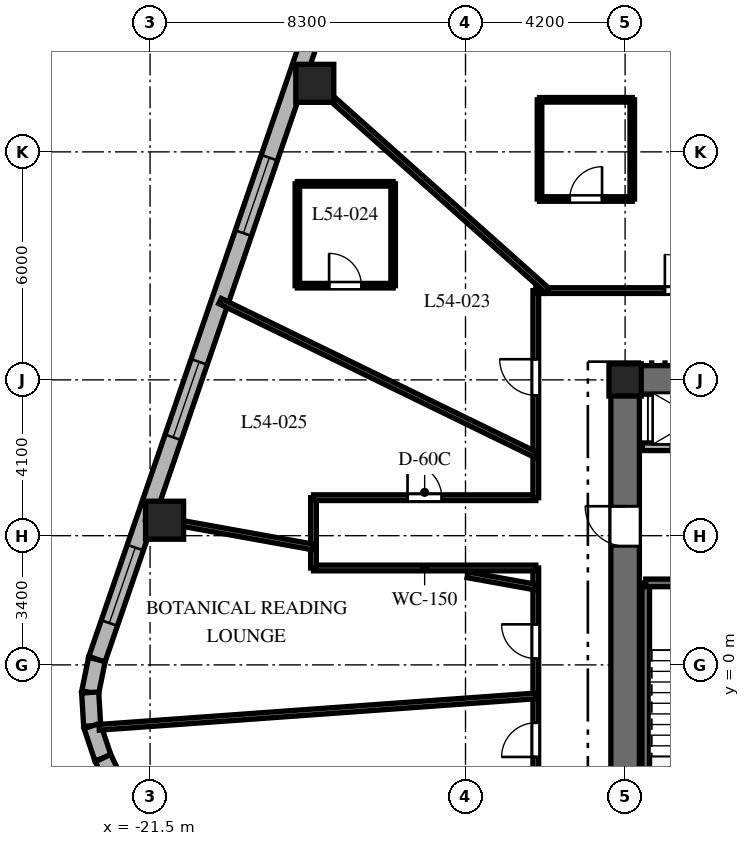
"""IFC4 building model, lengths in metres.
Left out: names, types, materials, properties, quantities, classifications, styles, units other than length and angle.
Written with IfcOpenShell. Run it as: python <this file> out.ifc"""

import sys

from ifc_helpers import new_model, si_unit, direction, frame, frame_2d, origin, origin_2d, place, context, subcontext, project, spatial, rectangle, extrude, element, fill, save


model = new_model("IFC4")
c1 = context("Model", 3, precision=1e-05, world=origin(), true_north=direction((0.0, 1.0)))
c2 = subcontext(c1, "Body", "Model", "MODEL_VIEW")
j1 = project(units=[si_unit("LENGTHUNIT", "METRE"), si_unit("PLANEANGLEUNIT", "RADIAN")], contexts=[c1])
p1 = place(None, origin())
s1 = spatial("IfcSite", under=j1, at=p1, CompositionType="ELEMENT")
p2 = place(p1, origin())
s2 = spatial("IfcBuilding", under=s1, at=p2, CompositionType="ELEMENT")
p3 = place(p2, frame((0.0, 0.0, 217.9)))
s3 = spatial("IfcBuildingStorey", under=s2, at=p3, CompositionType="ELEMENT", Elevation=217.9)
p4 = place(p3, frame((-9.375, 7.5, 0.0), z_axis=(0.0, 0.0, 1.0), x_axis=(1.0, 0.0, 0.0)))
e1 = element("IfcWall", 1, at=p4, inside=s3, PredefinedType="SHEAR", context=c2, shape_type="SweptSolid", body=[
    extrude(rectangle(XDim=9.425, YDim=0.75, at=frame_2d((4.712, 0.0))), origin(), (0.0, 0.0, 1.0), 3.8),
])
p5 = place(p3, frame((-9.0, -7.125, 0.0), z_axis=(0.0, 0.0, 1.0), x_axis=(0.0, 1.0, 0.0)))
e2 = element("IfcWall", 2, at=p5, inside=s3, PredefinedType="SHEAR", context=c2, shape_type="SweptSolid", body=[
    extrude(rectangle(XDim=14.25, YDim=0.75, at=frame_2d((7.125, 0.0))), origin(), (0.0, 0.0, 1.0), 3.8),
])
p6 = place(p5, frame((10.25, 0.0, 0.0)))
e3 = element("IfcOpeningElement", 3, at=p6, cuts=e2, PredefinedType="OPENING", context=c2, shape_type="SweptSolid", body=[
    extrude(rectangle(XDim=1.05, YDim=2.15, at=frame_2d((0.525, 1.075))), frame((0.0, 0.385, 0.0), z_axis=(0.0, -1.0, 0.0), x_axis=(1.0, 0.0, 0.0)), (0.0, 0.0, 1.0), 0.77),
])
p7 = place(p3, frame((-8.458, -6.985, 0.0), z_axis=(0.0, 0.0, 1.0), x_axis=(0.0, 1.0, 0.0)))
e4 = element("IfcWall", 4, at=p7, inside=s3, PredefinedType="SHEAR", context=c2, shape_type="SweptSolid", body=[
    extrude(rectangle(XDim=9.143, YDim=0.2, at=frame_2d((4.572, 0.0))), origin(), (0.0, 0.0, 1.0), 3.8),
])
p8 = place(p3, frame((-8.458, 2.158, 0.0), z_axis=(0.0, 0.0, 1.0), x_axis=(1.0, 0.0, 0.0)))
e5 = element("IfcWall", 5, at=p8, inside=s3, PredefinedType="SHEAR", context=c2, shape_type="SweptSolid", body=[
    extrude(rectangle(XDim=3.686, YDim=0.2, at=frame_2d((1.843, 0.0))), origin(), (0.0, 0.0, 1.0), 3.8),
])
p9 = place(p8, frame((1.3, 0.0, 0.0)))
e6 = element("IfcOpeningElement", 6, at=p9, cuts=e5, PredefinedType="OPENING", context=c2, shape_type="SweptSolid", body=[
    extrude(rectangle(XDim=1.0, YDim=2.15, at=frame_2d((0.5, 1.075))), frame((0.0, 0.11, 0.0), z_axis=(0.0, -1.0, 0.0), x_axis=(1.0, 0.0, 0.0)), (0.0, 0.0, 1.0), 0.22),
])
p10 = place(p3, frame((-9.0, 7.5, 0.0), z_axis=(0.0, 0.0, 1.0), x_axis=(1.0, 0.0, 0.0)))
e7 = element("IfcColumn", 7, at=p10, inside=s3, PredefinedType="COLUMN", context=c2, shape_type="SweptSolid", body=[
    extrude(rectangle(XDim=0.85, YDim=0.85, at=origin_2d()), origin(), (0.0, 0.0, 1.0), 3.8),
])
for number, where, z_axis, x_axis in (
    (8, (-17.166, 15.304, 0.0), (0.0, 0.0, 1.0), (1.0, 0.0, 0.0)),
    (9, (-21.118, 3.807, 0.0), (0.0, 0.0, 1.0), (1.0, 0.0, 0.0)),
):
    element("IfcColumn", number, at=place(p3, frame(where, z_axis=z_axis, x_axis=x_axis)), inside=s3, PredefinedType="COLUMN", context=c2, shape_type="SweptSolid", body=[
        extrude(rectangle(XDim=1.0, YDim=1.0, at=origin_2d()), origin(), (0.0, 0.0, 1.0), 3.8),
    ])
p11 = place(p3, frame((-22.898, 0.15, 0.0), z_axis=(0.0, 0.0, 1.0), x_axis=(-0.199055826889, -0.979988151858, 0.0)))
e10 = element("IfcWall", 10, at=p11, inside=s3, PredefinedType="SOLIDWALL", context=c2, shape_type="SweptSolid", body=[
    extrude(rectangle(XDim=0.894, YDim=0.45, at=frame_2d((0.447, 0.0))), origin(), (0.0, 0.0, 1.0), 3.5),
])
p12 = place(p3, frame((-23.076, -0.727, 0.0), z_axis=(0.0, 0.0, 1.0), x_axis=(0.060805222108, -0.998149650586, 0.0)))
e11 = element("IfcWall", 11, at=p12, inside=s3, PredefinedType="SOLIDWALL", context=c2, shape_type="SweptSolid", body=[
    extrude(rectangle(XDim=0.879, YDim=0.45, at=frame_2d((0.44, 0.0))), origin(), (0.0, 0.0, 1.0), 3.5),
])
p13 = place(p3, frame((-23.023, -1.604, 0.0), z_axis=(0.0, 0.0, 1.0), x_axis=(0.316801227695, -0.948491951537, 0.0)))
e12 = element("IfcWall", 12, at=p13, inside=s3, PredefinedType="SOLIDWALL", context=c2, shape_type="SweptSolid", body=[
    extrude(rectangle(XDim=0.894, YDim=0.45, at=frame_2d((0.447, 0.0))), origin(), (0.0, 0.0, 1.0), 3.5),
])
p14 = place(p3, frame((-16.324, 19.275, 0.0), z_axis=(0.0, 0.0, 1.0), x_axis=(-0.325083142304, -0.945685439557, 0.0)))
e13 = element("IfcWall", 13, at=p14, inside=s3, PredefinedType="SOLIDWALL", context=c2, shape_type="SweptSolid", body=[
    extrude(rectangle(XDim=20.224, YDim=0.45, at=frame_2d((10.112, 0.0))), origin(), (0.0, 0.0, 1.0), 3.5),
])
p15 = place(p14, frame((0.953, 0.0, 0.8)))
e14 = element("IfcOpeningElement", 14, at=p15, cuts=e13, PredefinedType="OPENING", context=c2, shape_type="SweptSolid", body=[
    extrude(rectangle(XDim=2.1, YDim=1.85, at=frame_2d((1.05, 0.925))), frame((0.0, 0.235, 0.0), z_axis=(0.0, -1.0, 0.0), x_axis=(1.0, 0.0, 0.0)), (0.0, 0.0, 1.0), 0.47),
])
p16 = place(p14, frame((6.268, 0.0, 0.8)))
e15 = element("IfcOpeningElement", 15, at=p16, cuts=e13, PredefinedType="OPENING", context=c2, shape_type="SweptSolid", body=[
    extrude(rectangle(XDim=2.1, YDim=1.85, at=frame_2d((1.05, 0.925))), frame((0.0, 0.235, 0.0), z_axis=(0.0, -1.0, 0.0), x_axis=(1.0, 0.0, 0.0)), (0.0, 0.0, 1.0), 0.47),
])
p17 = place(p14, frame((11.95, 0.0, 0.8)))
e16 = element("IfcOpeningElement", 16, at=p17, cuts=e13, PredefinedType="OPENING", context=c2, shape_type="SweptSolid", body=[
    extrude(rectangle(XDim=2.1, YDim=1.85, at=frame_2d((1.05, 0.925))), frame((0.0, 0.235, 0.0), z_axis=(0.0, -1.0, 0.0), x_axis=(1.0, 0.0, 0.0)), (0.0, 0.0, 1.0), 0.47),
])
p18 = place(p14, frame((17.118, 0.0, 0.8)))
e17 = element("IfcOpeningElement", 17, at=p18, cuts=e13, PredefinedType="OPENING", context=c2, shape_type="SweptSolid", body=[
    extrude(rectangle(XDim=2.1, YDim=1.85, at=frame_2d((1.05, 0.925))), frame((0.0, 0.235, 0.0), z_axis=(0.0, -1.0, 0.0), x_axis=(1.0, 0.0, 0.0)), (0.0, 0.0, 1.0), 0.47),
])
p19 = place(p3, frame((-22.74, -2.452, 0.0), z_axis=(0.0, 0.0, 1.0), x_axis=(0.437753424814, -0.899095066755, 0.0)))
e18 = element("IfcWall", 18, at=p19, inside=s3, PredefinedType="SOLIDWALL", context=c2, shape_type="SweptSolid", body=[
    extrude(rectangle(XDim=19.137, YDim=0.45, at=frame_2d((9.569, 0.0))), origin(), (0.0, 0.0, 1.0), 3.5),
])
p20 = place(p19, frame((4.763, 0.0, 0.0)))
e19 = element("IfcOpeningElement", 19, at=p20, cuts=e18, PredefinedType="OPENING", context=c2, shape_type="SweptSolid", body=[
    extrude(rectangle(XDim=0.95, YDim=2.15, at=frame_2d((0.475, 1.075))), frame((0.0, 0.235, 0.0), z_axis=(0.0, -1.0, 0.0), x_axis=(1.0, 0.0, 0.0)), (0.0, 0.0, 1.0), 0.47),
])
p21 = place(p19, frame((1.216, 0.0, 0.8)))
e20 = element("IfcOpeningElement", 20, at=p21, cuts=e18, PredefinedType="OPENING", context=c2, shape_type="SweptSolid", body=[
    extrude(rectangle(XDim=1.5, YDim=1.8, at=frame_2d((0.75, 0.9))), frame((0.0, 0.235, 0.0), z_axis=(0.0, -1.0, 0.0), x_axis=(1.0, 0.0, 0.0)), (0.0, 0.0, 1.0), 0.47),
])
p22 = place(p19, frame((8.87, 0.0, 0.8)))
e21 = element("IfcOpeningElement", 21, at=p22, cuts=e18, PredefinedType="OPENING", context=c2, shape_type="SweptSolid", body=[
    extrude(rectangle(XDim=1.5, YDim=1.8, at=frame_2d((0.75, 0.9))), frame((0.0, 0.235, 0.0), z_axis=(0.0, -1.0, 0.0), x_axis=(1.0, 0.0, 0.0)), (0.0, 0.0, 1.0), 0.47),
])
p23 = place(p19, frame((16.473, 0.0, 0.8)))
e22 = element("IfcOpeningElement", 22, at=p23, cuts=e18, PredefinedType="OPENING", context=c2, shape_type="SweptSolid", body=[
    extrude(rectangle(XDim=1.5, YDim=1.8, at=frame_2d((0.75, 0.9))), frame((0.0, 0.235, 0.0), z_axis=(0.0, -1.0, 0.0), x_axis=(1.0, 0.0, 0.0)), (0.0, 0.0, 1.0), 0.47),
])
p24 = place(p3, frame((-8.55, 5.74, 0.0), z_axis=(0.0, 0.0, 1.0), x_axis=(1.0, 0.0, 0.0)))
e23 = element("IfcWall", 23, at=p24, inside=s3, PredefinedType="PARTITIONING", context=c2, shape_type="SweptSolid", body=[
    extrude(rectangle(XDim=4.05, YDim=0.2, at=frame_2d((2.025, 0.0))), origin(), (0.0, 0.0, 1.0), 3.5),
])
p25 = place(p24, frame((0.75, 0.0, 0.0)))
e24 = element("IfcOpeningElement", 24, at=p25, cuts=e23, PredefinedType="OPENING", context=c2, shape_type="SweptSolid", body=[
    extrude(rectangle(XDim=1.1, YDim=2.2, at=frame_2d((0.55, 1.1))), frame((0.0, 0.11, 0.0), z_axis=(0.0, -1.0, 0.0), x_axis=(1.0, 0.0, 0.0)), (0.0, 0.0, 1.0), 0.22),
])
p26 = place(p24, frame((2.9, 0.0, 0.0)))
e25 = element("IfcOpeningElement", 25, at=p26, cuts=e23, PredefinedType="OPENING", context=c2, shape_type="SweptSolid", body=[
    extrude(rectangle(XDim=0.85, YDim=2.03, at=frame_2d((0.425, 1.015))), frame((0.0, 0.11, 0.0), z_axis=(0.0, -1.0, 0.0), x_axis=(1.0, 0.0, 0.0)), (0.0, 0.0, 1.0), 0.22),
])
p27 = place(p3, frame((-11.35, -9.85, 0.0), z_axis=(0.0, 0.0, 1.0), x_axis=(0.0, 1.0, 0.0)))
e26 = element("IfcWall", 26, at=p27, inside=s3, PredefinedType="PARTITIONING", context=c2, shape_type="SweptSolid", body=[
    extrude(rectangle(XDim=12.4, YDim=0.15, at=frame_2d((6.2, 0.0))), origin(), (0.0, 0.0, 1.0), 2.99),
])
p28 = place(p27, frame((10.017, 0.0, 0.0)))
e27 = element("IfcOpeningElement", 27, at=p28, cuts=e26, PredefinedType="OPENING", context=c2, shape_type="SweptSolid", body=[
    extrude(rectangle(XDim=0.9, YDim=2.03, at=frame_2d((0.45, 1.015))), frame((0.0, 0.085, 0.0), z_axis=(0.0, -1.0, 0.0), x_axis=(1.0, 0.0, 0.0)), (0.0, 0.0, 1.0), 0.17),
])
p29 = place(p27, frame((7.427, 0.0, 0.0)))
e28 = element("IfcOpeningElement", 28, at=p29, cuts=e26, PredefinedType="OPENING", context=c2, shape_type="SweptSolid", body=[
    extrude(rectangle(XDim=0.9, YDim=2.03, at=frame_2d((0.45, 1.015))), frame((0.0, 0.085, 0.0), z_axis=(0.0, -1.0, 0.0), x_axis=(1.0, 0.0, 0.0)), (0.0, 0.0, 1.0), 0.17),
])
p30 = place(p27, frame((3.01, 0.0, 0.0)))
e29 = element("IfcOpeningElement", 29, at=p30, cuts=e26, PredefinedType="OPENING", context=c2, shape_type="SweptSolid", body=[
    extrude(rectangle(XDim=0.95, YDim=2.03, at=frame_2d((0.475, 1.015))), frame((0.0, 0.085, 0.0), z_axis=(0.0, -1.0, 0.0), x_axis=(1.0, 0.0, 0.0)), (0.0, 0.0, 1.0), 0.17),
])
p31 = place(p3, frame((-11.35, 2.55, 0.0), z_axis=(0.0, 0.0, 1.0), x_axis=(-1.0, 0.0, 0.0)))
e30 = element("IfcWall", 30, at=p31, inside=s3, PredefinedType="PARTITIONING", context=c2, shape_type="SweptSolid", body=[
    extrude(rectangle(XDim=5.85, YDim=0.15, at=frame_2d((2.925, 0.0))), origin(), (0.0, 0.0, 1.0), 2.941),
])
p32 = place(p3, frame((-17.2, 2.55, 0.0), z_axis=(0.0, 0.0, 1.0), x_axis=(0.0, 1.0, 0.0)))
e31 = element("IfcWall", 31, at=p32, inside=s3, PredefinedType="PARTITIONING", context=c2, shape_type="SweptSolid", body=[
    extrude(rectangle(XDim=1.85, YDim=0.15, at=frame_2d((0.925, 0.0))), origin(), (0.0, 0.0, 1.0), 2.941),
])
p33 = place(p3, frame((-17.2, 4.4, 0.0), z_axis=(0.0, 0.0, 1.0), x_axis=(1.0, 0.0, 0.0)))
e32 = element("IfcWall", 32, at=p33, inside=s3, PredefinedType="PARTITIONING", context=c2, shape_type="SweptSolid", body=[
    extrude(rectangle(XDim=5.85, YDim=0.15, at=frame_2d((2.925, 0.0))), origin(), (0.0, 0.0, 1.0), 2.941),
])
p34 = place(p33, frame((2.475, 0.0, 0.0)))
e33 = element("IfcOpeningElement", 33, at=p34, cuts=e32, PredefinedType="OPENING", context=c2, shape_type="SweptSolid", body=[
    extrude(rectangle(XDim=0.9, YDim=2.03, at=frame_2d((0.45, 1.015))), frame((0.0, 0.085, 0.0), z_axis=(0.0, -1.0, 0.0), x_axis=(1.0, 0.0, 0.0)), (0.0, 0.0, 1.0), 0.17),
])
p35 = place(p3, frame((-11.35, 4.4, 0.0), z_axis=(0.0, 0.0, 1.0), x_axis=(0.0, 1.0, 0.0)))
e34 = element("IfcWall", 34, at=p35, inside=s3, PredefinedType="PARTITIONING", context=c2, shape_type="SweptSolid", body=[
    extrude(rectangle(XDim=5.45, YDim=0.15, at=frame_2d((2.725, 0.0))), origin(), (0.0, 0.0, 1.0), 2.99),
])
p36 = place(p35, frame((2.694, 0.0, 0.0)))
e35 = element("IfcOpeningElement", 35, at=p36, cuts=e34, PredefinedType="OPENING", context=c2, shape_type="SweptSolid", body=[
    extrude(rectangle(XDim=0.95, YDim=2.03, at=frame_2d((0.475, 1.015))), frame((0.0, 0.085, 0.0), z_axis=(0.0, -1.0, 0.0), x_axis=(1.0, 0.0, 0.0)), (0.0, 0.0, 1.0), 0.17),
])
p37 = place(p3, frame((-11.35, 9.85, 0.0), z_axis=(0.0, 0.0, 1.0), x_axis=(1.0, 0.0, 0.0)))
e36 = element("IfcWall", 36, at=p37, inside=s3, PredefinedType="PARTITIONING", context=c2, shape_type="SweptSolid", body=[
    extrude(rectangle(XDim=10.43, YDim=0.15, at=frame_2d((5.215, 0.0))), origin(), (0.0, 0.0, 1.0), 2.99),
])
p38 = place(p37, frame((8.362, 0.0, 0.0)))
e37 = element("IfcOpeningElement", 37, at=p38, cuts=e36, PredefinedType="OPENING", context=c2, shape_type="SweptSolid", body=[
    extrude(rectangle(XDim=0.95, YDim=2.03, at=frame_2d((0.475, 1.015))), frame((0.0, 0.085, 0.0), z_axis=(0.0, -1.0, 0.0), x_axis=(1.0, 0.0, 0.0)), (0.0, 0.0, 1.0), 0.17),
])
p39 = place(p37, frame((3.396, 0.0, 0.0)))
e38 = element("IfcOpeningElement", 38, at=p39, cuts=e36, PredefinedType="OPENING", context=c2, shape_type="SweptSolid", body=[
    extrude(rectangle(XDim=0.95, YDim=2.03, at=frame_2d((0.475, 1.015))), frame((0.0, 0.085, 0.0), z_axis=(0.0, -1.0, 0.0), x_axis=(1.0, 0.0, 0.0)), (0.0, 0.0, 1.0), 0.17),
])
p40 = place(p3, frame((-3.848, 9.85, 0.0), z_axis=(0.0, 0.0, 1.0), x_axis=(-0.363921778212, 0.931429513889, 0.0)))
e39 = element("IfcWall", 39, at=p40, inside=s3, PredefinedType="PARTITIONING", context=c2, shape_type="SweptSolid", body=[
    extrude(rectangle(XDim=12.588, YDim=0.15, at=frame_2d((6.294, 0.0))), origin(), (0.0, 0.0, 1.0), 2.74),
])
p41 = place(p3, frame((-11.048, 9.85, 0.0), z_axis=(0.0, 0.0, 1.0), x_axis=(-0.746444434655, 0.665447748492, 0.0)))
e40 = element("IfcWall", 40, at=p41, inside=s3, PredefinedType="PARTITIONING", context=c2, shape_type="SweptSolid", body=[
    extrude(rectangle(XDim=8.732, YDim=0.15, at=frame_2d((4.366, 0.0))), origin(), (0.0, 0.0, 1.0), 2.74),
])
p42 = place(p3, frame((-11.35, 5.528, 0.0), z_axis=(0.0, 0.0, 1.0), x_axis=(-0.899038669565, 0.437869239188, 0.0)))
e41 = element("IfcWall", 41, at=p42, inside=s3, PredefinedType="PARTITIONING", context=c2, shape_type="SweptSolid", body=[
    extrude(rectangle(XDim=9.242, YDim=0.15, at=frame_2d((4.621, 0.0))), origin(), (0.0, 0.0, 1.0), 2.74),
])
p43 = place(p3, frame((-11.35, 2.046, 0.0), z_axis=(0.0, 0.0, 1.0), x_axis=(-0.984127783205, 0.177461281195, 0.0)))
e42 = element("IfcWall", 42, at=p43, inside=s3, PredefinedType="PARTITIONING", context=c2, shape_type="SweptSolid", body=[
    extrude(rectangle(XDim=1.826, YDim=0.15, at=frame_2d((0.913, 0.0))), origin(), (0.0, 0.0, 1.0), 3.5),
])
p44 = place(p3, frame((-17.2, 3.101, 0.0), z_axis=(0.0, 0.0, 1.0), x_axis=(-0.98413465883, 0.177423147559, 0.0)))
e43 = element("IfcWall", 43, at=p44, inside=s3, PredefinedType="PARTITIONING", context=c2, shape_type="SweptSolid", body=[
    extrude(rectangle(XDim=4.482, YDim=0.15, at=frame_2d((2.241, 0.0))), origin(), (0.0, 0.0, 1.0), 2.74),
])
p45 = place(p3, frame((-11.35, -0.816, 0.0), z_axis=(0.0, 0.0, 1.0), x_axis=(-0.997425460629, -0.071710881252, 0.0)))
e44 = element("IfcWall", 44, at=p45, inside=s3, PredefinedType="PARTITIONING", context=c2, shape_type="SweptSolid", body=[
    extrude(rectangle(XDim=11.521, YDim=0.15, at=frame_2d((5.76, 0.0))), origin(), (0.0, 0.0, 1.0), 2.74),
])
p46 = place(p3, frame((-11.252, 12.26, 0.0), z_axis=(0.0, 0.0, 1.0), x_axis=(1.0, 0.0, 0.0)))
e45 = element("IfcWall", 45, at=p46, inside=s3, PredefinedType="PARTITIONING", context=c2, shape_type="SweptSolid", body=[
    extrude(rectangle(XDim=2.44, YDim=0.12, at=frame_2d((1.22, 0.0))), origin(), (0.0, 0.0, 1.0), 3.073),
])
p47 = place(p46, frame((0.795, 0.0, 0.0)))
e46 = element("IfcOpeningElement", 46, at=p47, cuts=e45, PredefinedType="OPENING", context=c2, shape_type="SweptSolid", body=[
    extrude(rectangle(XDim=0.85, YDim=2.03, at=frame_2d((0.425, 1.015))), frame((0.0, 0.07, 0.0), z_axis=(0.0, -1.0, 0.0), x_axis=(1.0, 0.0, 0.0)), (0.0, 0.0, 1.0), 0.14),
])
p48 = place(p3, frame((-8.812, 12.26, 0.0), z_axis=(0.0, 0.0, 1.0), x_axis=(0.0, 1.0, 0.0)))
e47 = element("IfcWall", 47, at=p48, inside=s3, PredefinedType="PARTITIONING", context=c2, shape_type="SweptSolid", body=[
    extrude(rectangle(XDim=2.61, YDim=0.12, at=frame_2d((1.305, 0.0))), origin(), (0.0, 0.0, 1.0), 2.99),
])
p49 = place(p3, frame((-8.812, 14.87, 0.0), z_axis=(0.0, 0.0, 1.0), x_axis=(-1.0, 0.0, 0.0)))
e48 = element("IfcWall", 48, at=p49, inside=s3, PredefinedType="PARTITIONING", context=c2, shape_type="SweptSolid", body=[
    extrude(rectangle(XDim=2.44, YDim=0.12, at=frame_2d((1.22, 0.0))), origin(), (0.0, 0.0, 1.0), 3.027),
])
p50 = place(p3, frame((-11.252, 14.87, 0.0), z_axis=(0.0, 0.0, 1.0), x_axis=(0.0, -1.0, 0.0)))
e49 = element("IfcWall", 49, at=p50, inside=s3, PredefinedType="PARTITIONING", context=c2, shape_type="SweptSolid", body=[
    extrude(rectangle(XDim=2.61, YDim=0.12, at=frame_2d((1.305, 0.0))), origin(), (0.0, 0.0, 1.0), 3.027),
])
p51 = place(p3, frame((-17.624, 9.979, 0.0), z_axis=(0.0, 0.0, 1.0), x_axis=(1.0, 0.0, 0.0)))
e50 = element("IfcWall", 50, at=p51, inside=s3, PredefinedType="PARTITIONING", context=c2, shape_type="SweptSolid", body=[
    extrude(rectangle(XDim=2.52, YDim=0.12, at=frame_2d((1.26, 0.0))), origin(), (0.0, 0.0, 1.0), 3.073),
])
p52 = place(p51, frame((0.835, 0.0, 0.0)))
e51 = element("IfcOpeningElement", 51, at=p52, cuts=e50, PredefinedType="OPENING", context=c2, shape_type="SweptSolid", body=[
    extrude(rectangle(XDim=0.85, YDim=2.03, at=frame_2d((0.425, 1.015))), frame((0.0, 0.07, 0.0), z_axis=(0.0, -1.0, 0.0), x_axis=(1.0, 0.0, 0.0)), (0.0, 0.0, 1.0), 0.14),
])
p53 = place(p3, frame((-15.104, 9.979, 0.0), z_axis=(0.0, 0.0, 1.0), x_axis=(0.0, 1.0, 0.0)))
e52 = element("IfcWall", 52, at=p53, inside=s3, PredefinedType="PARTITIONING", context=c2, shape_type="SweptSolid", body=[
    extrude(rectangle(XDim=2.68, YDim=0.12, at=frame_2d((1.34, 0.0))), origin(), (0.0, 0.0, 1.0), 3.073),
])
p54 = place(p3, frame((-15.104, 12.659, 0.0), z_axis=(0.0, 0.0, 1.0), x_axis=(-1.0, 0.0, 0.0)))
e53 = element("IfcWall", 53, at=p54, inside=s3, PredefinedType="PARTITIONING", context=c2, shape_type="SweptSolid", body=[
    extrude(rectangle(XDim=2.52, YDim=0.12, at=frame_2d((1.26, 0.0))), origin(), (0.0, 0.0, 1.0), 3.5),
])
p55 = place(p3, frame((-17.624, 12.659, 0.0), z_axis=(0.0, 0.0, 1.0), x_axis=(0.0, -1.0, 0.0)))
e54 = element("IfcWall", 54, at=p55, inside=s3, PredefinedType="PARTITIONING", context=c2, shape_type="SweptSolid", body=[
    extrude(rectangle(XDim=2.68, YDim=0.12, at=frame_2d((1.34, 0.0))), origin(), (0.0, 0.0, 1.0), 3.5),
])
p56 = place(p16, origin())
e55 = element("IfcWindow", 55, at=p56, inside=s3, PartitioningType="SINGLE_PANEL", PredefinedType="WINDOW", context=c2, shape_type="SweptSolid", body=[
    extrude(rectangle(XDim=2.1, YDim=1.85, at=frame_2d((1.05, 0.925))), frame((0.0, 0.03, 0.0), z_axis=(0.0, -1.0, 0.0), x_axis=(1.0, 0.0, 0.0)), (0.0, 0.0, 1.0), 0.06),
])
fill(e15, e55)
p57 = place(p17, origin())
e56 = element("IfcWindow", 56, at=p57, inside=s3, PartitioningType="SINGLE_PANEL", PredefinedType="WINDOW", context=c2, shape_type="SweptSolid", body=[
    extrude(rectangle(XDim=2.1, YDim=1.85, at=frame_2d((1.05, 0.925))), frame((0.0, 0.03, 0.0), z_axis=(0.0, -1.0, 0.0), x_axis=(1.0, 0.0, 0.0)), (0.0, 0.0, 1.0), 0.06),
])
fill(e16, e56)
p58 = place(p18, origin())
e57 = element("IfcWindow", 57, at=p58, inside=s3, PartitioningType="SINGLE_PANEL", PredefinedType="WINDOW", context=c2, shape_type="SweptSolid", body=[
    extrude(rectangle(XDim=2.1, YDim=1.85, at=frame_2d((1.05, 0.925))), frame((0.0, 0.03, 0.0), z_axis=(0.0, -1.0, 0.0), x_axis=(1.0, 0.0, 0.0)), (0.0, 0.0, 1.0), 0.06),
])
fill(e17, e57)
p59 = place(p6, origin())
e58 = element("IfcDoor", 58, at=p59, inside=s3, OperationType="SINGLE_SWING_RIGHT", PredefinedType="DOOR", context=c2, shape_type="SweptSolid", body=[
    extrude(rectangle(XDim=1.05, YDim=2.15, at=frame_2d((0.525, 1.075))), frame((0.0, 0.025, 0.0), z_axis=(0.0, -1.0, 0.0), x_axis=(1.0, 0.0, 0.0)), (0.0, 0.0, 1.0), 0.05),
])
fill(e3, e58)
p60 = place(p39, origin())
e59 = element("IfcDoor", 59, at=p60, inside=s3, OperationType="SINGLE_SWING_LEFT", PredefinedType="DOOR", context=c2, shape_type="SweptSolid", body=[
    extrude(rectangle(XDim=0.95, YDim=2.03, at=frame_2d((0.475, 1.015))), frame((0.0, 0.025, 0.0), z_axis=(0.0, -1.0, 0.0), x_axis=(1.0, 0.0, 0.0)), (0.0, 0.0, 1.0), 0.05),
])
fill(e38, e59)
p61 = place(p47, origin())
e60 = element("IfcDoor", 60, at=p61, inside=s3, OperationType="SINGLE_SWING_RIGHT", PredefinedType="DOOR", context=c2, shape_type="SweptSolid", body=[
    extrude(rectangle(XDim=0.85, YDim=2.03, at=frame_2d((0.425, 1.015))), frame((0.0, 0.025, 0.0), z_axis=(0.0, -1.0, 0.0), x_axis=(1.0, 0.0, 0.0)), (0.0, 0.0, 1.0), 0.05),
])
fill(e46, e60)
p62 = place(p36, origin())
e61 = element("IfcDoor", 61, at=p62, inside=s3, OperationType="SINGLE_SWING_RIGHT", PredefinedType="DOOR", context=c2, shape_type="SweptSolid", body=[
    extrude(rectangle(XDim=0.95, YDim=2.03, at=frame_2d((0.475, 1.015))), frame((0.0, 0.025, 0.0), z_axis=(0.0, -1.0, 0.0), x_axis=(1.0, 0.0, 0.0)), (0.0, 0.0, 1.0), 0.05),
])
fill(e35, e61)
p63 = place(p52, origin())
e62 = element("IfcDoor", 62, at=p63, inside=s3, OperationType="SINGLE_SWING_LEFT", PredefinedType="DOOR", context=c2, shape_type="SweptSolid", body=[
    extrude(rectangle(XDim=0.85, YDim=2.03, at=frame_2d((0.425, 1.015))), frame((0.0, 0.025, 0.0), z_axis=(0.0, -1.0, 0.0), x_axis=(1.0, 0.0, 0.0)), (0.0, 0.0, 1.0), 0.05),
])
fill(e51, e62)
p64 = place(p34, origin())
e63 = element("IfcDoor", 63, at=p64, inside=s3, OperationType="SINGLE_SWING_LEFT", PredefinedType="DOOR", context=c2, shape_type="SweptSolid", body=[
    extrude(rectangle(XDim=0.9, YDim=2.03, at=frame_2d((0.45, 1.015))), frame((0.0, 0.025, 0.0), z_axis=(0.0, -1.0, 0.0), x_axis=(1.0, 0.0, 0.0)), (0.0, 0.0, 1.0), 0.05),
])
fill(e33, e63)
p65 = place(p28, origin())
e64 = element("IfcDoor", 64, at=p65, inside=s3, OperationType="SINGLE_SWING_RIGHT", PredefinedType="DOOR", context=c2, shape_type="SweptSolid", body=[
    extrude(rectangle(XDim=0.9, YDim=2.03, at=frame_2d((0.45, 1.015))), frame((0.0, 0.025, 0.0), z_axis=(0.0, -1.0, 0.0), x_axis=(1.0, 0.0, 0.0)), (0.0, 0.0, 1.0), 0.05),
])
fill(e27, e64)
p66 = place(p29, origin())
e65 = element("IfcDoor", 65, at=p66, inside=s3, OperationType="SINGLE_SWING_LEFT", PredefinedType="DOOR", context=c2, shape_type="SweptSolid", body=[
    extrude(rectangle(XDim=0.9, YDim=2.03, at=frame_2d((0.45, 1.015))), frame((0.0, 0.025, 0.0), z_axis=(0.0, -1.0, 0.0), x_axis=(1.0, 0.0, 0.0)), (0.0, 0.0, 1.0), 0.05),
])
fill(e28, e65)
save(model, sys.argv[1])
